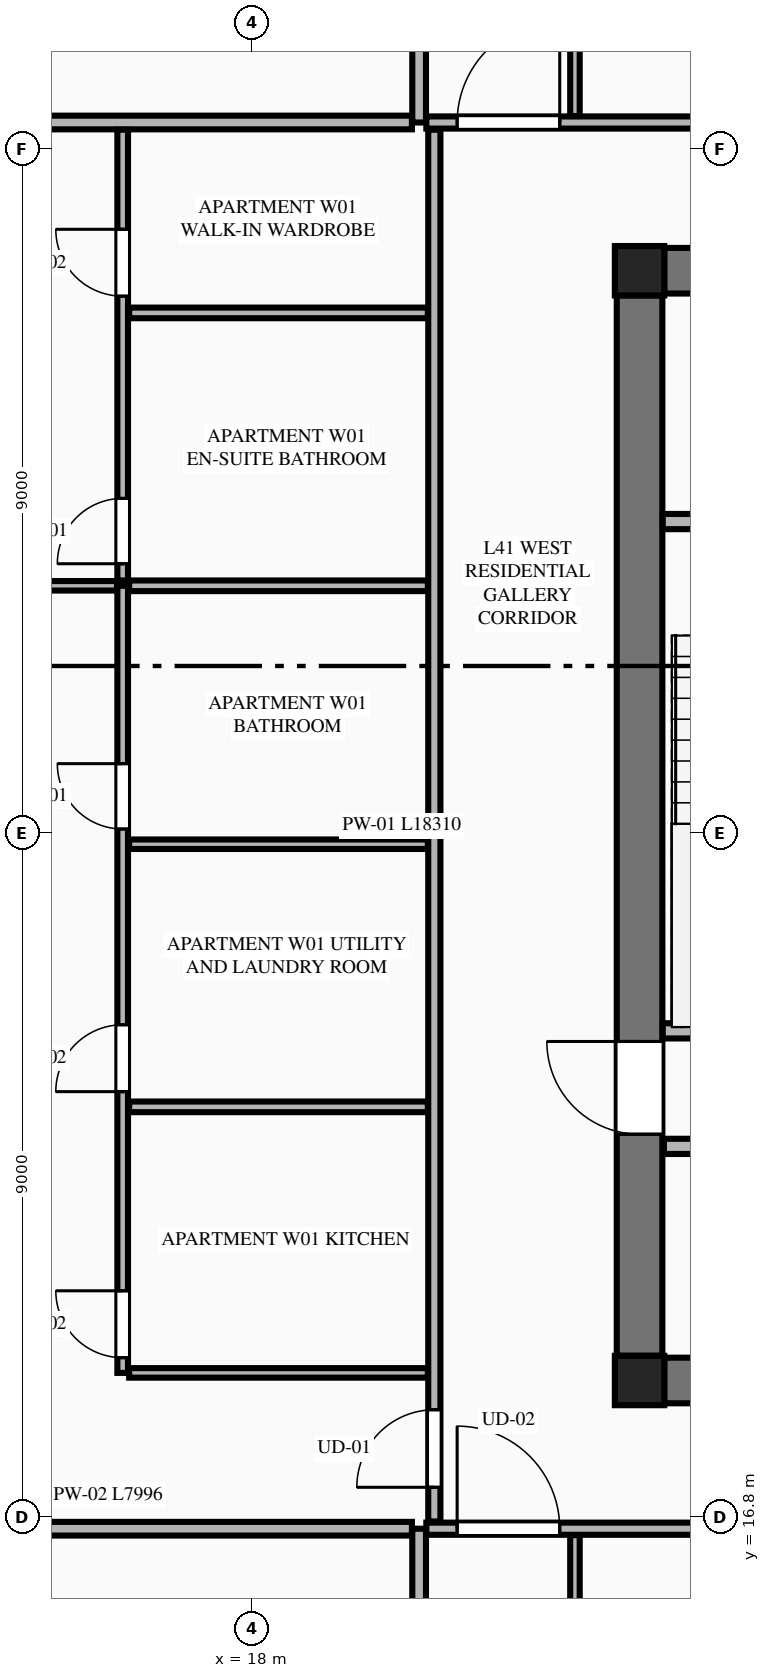
"""IFC4 building model, lengths in metres.
Left out: names, types, materials, properties, quantities, classifications, styles, units other than length and angle.
Written with IfcOpenShell. Run it as: python <this file> out.ifc"""

import sys

from ifc_helpers import new_model, si_unit, direction, frame, frame_2d, origin, origin_2d, place, context, subcontext, project, spatial, rectangle, extrude, element, fill, save


model = new_model("IFC4")
c1 = context("Model", 3, precision=1e-05, world=origin(), true_north=direction((0.0, 1.0)))
c2 = subcontext(c1, "Body", "Model", "MODEL_VIEW")
j1 = project(units=[si_unit("LENGTHUNIT", "METRE"), si_unit("PLANEANGLEUNIT", "RADIAN")], contexts=[c1])
p1 = place(None, origin())
s1 = spatial("IfcSite", under=j1, at=p1, CompositionType="ELEMENT")
p2 = place(p1, origin())
s2 = spatial("IfcBuilding", under=s1, at=p2, CompositionType="ELEMENT")
p3 = place(p2, frame((0.0, 0.0, 157.05)))
s3 = spatial("IfcBuildingStorey", under=s2, at=p3, CompositionType="ELEMENT", Elevation=157.05)
for number, where, z_axis, x_axis in (
    (1, (23.1, 18.6, 0.0), (0.0, 0.0, 1.0), (1.0, 0.0, 0.0)),
    (2, (23.1, 33.2, 0.0), (0.0, 0.0, 1.0), (1.0, 0.0, 0.0)),
):
    element("IfcColumn", number, at=place(p3, frame(where, z_axis=z_axis, x_axis=x_axis)), inside=s3, PredefinedType="COLUMN", context=c2, shape_type="SweptSolid", body=[
        extrude(rectangle(XDim=0.65, YDim=0.65, at=origin_2d()), origin(), (0.0, 0.0, 1.0), 3.55),
    ])
for number, where, z_axis, x_axis in (
    (3, (23.425, 18.6, 0.0), (0.0, 0.0, 1.0), (1.0, 0.0, 0.0)),
    (4, (23.425, 33.2, 0.0), (0.0, 0.0, 1.0), (1.0, 0.0, 0.0)),
):
    element("IfcWall", number, at=place(p3, frame(where, z_axis=z_axis, x_axis=x_axis)), inside=s3, PredefinedType="SHEAR", context=c2, shape_type="SweptSolid", body=[
        extrude(rectangle(XDim=17.95, YDim=0.6, at=frame_2d((8.975, 0.0))), origin(), (0.0, 0.0, 1.0), 3.34),
    ])
p4 = place(p3, frame((23.1, 18.925, 0.0), z_axis=(0.0, 0.0, 1.0), x_axis=(0.0, 1.0, 0.0)))
e5 = element("IfcWall", 5, at=p4, inside=s3, PredefinedType="SHEAR", context=c2, shape_type="SweptSolid", body=[
    extrude(rectangle(XDim=13.95, YDim=0.6, at=frame_2d((6.975, 0.0))), origin(), (0.0, 0.0, 1.0), 3.34),
])
p5 = place(p4, frame((2.915, 0.0, 0.0)))
e6 = element("IfcOpeningElement", 6, at=p5, cuts=e5, PredefinedType="OPENING", context=c2, shape_type="SweptSolid", body=[
    extrude(rectangle(XDim=1.22, YDim=2.25, at=frame_2d((0.61, 1.125))), frame((0.0, 0.31, 0.0), z_axis=(0.0, -1.0, 0.0), x_axis=(1.0, 0.0, 0.0)), (0.0, 0.0, 1.0), 0.62),
])
p6 = place(p3, frame((23.405, 23.2, 0.0), z_axis=(0.0, 0.0, 1.0), x_axis=(1.0, 0.0, 0.0)))
e7 = element("IfcWall", 7, at=p6, inside=s3, PredefinedType="PLUMBINGWALL", context=c2, shape_type="SweptSolid", body=[
    extrude(rectangle(XDim=3.27, YDim=0.2, at=frame_2d((1.635, 0.0))), origin(), (0.0, 0.0, 1.0), 3.34),
])
p7 = place(p3, frame((23.405, 29.9, 0.0), z_axis=(0.0, 0.0, 1.0), x_axis=(1.0, 0.0, 0.0)))
e8 = element("IfcWall", 8, at=p7, inside=s3, PredefinedType="PLUMBINGWALL", context=c2, shape_type="SweptSolid", body=[
    extrude(rectangle(XDim=3.27, YDim=0.2, at=frame_2d((1.635, 0.0))), origin(), (0.0, 0.0, 1.0), 3.34),
])
p8 = place(p7, frame((1.85, 0.0, 0.0)))
e9 = element("IfcOpeningElement", 9, at=p8, cuts=e8, PredefinedType="OPENING", context=c2, shape_type="SweptSolid", body=[
    extrude(rectangle(XDim=0.85, YDim=2.05, at=frame_2d((0.425, 1.025))), frame((0.0, 0.11, 0.0), z_axis=(0.0, -1.0, 0.0), x_axis=(1.0, 0.0, 0.0)), (0.0, 0.0, 1.0), 0.22),
])
p9 = place(p3, frame((23.42, 21.68, 0.0), z_axis=(0.0, 0.0, 1.0), x_axis=(1.0, 0.0, 0.0)))
e10 = element("IfcWall", 10, at=p9, inside=s3, PredefinedType="PLUMBINGWALL", context=c2, shape_type="SweptSolid", body=[
    extrude(rectangle(XDim=17.96, YDim=0.2, at=frame_2d((8.98, 0.0))), origin(), (0.0, 0.0, 1.0), 3.34),
])
p10 = place(p9, frame((11.6, 0.0, 0.0)))
e11 = element("IfcOpeningElement", 11, at=p10, cuts=e10, PredefinedType="OPENING", context=c2, shape_type="SweptSolid", body=[
    extrude(rectangle(XDim=1.1, YDim=2.2, at=frame_2d((0.55, 1.1))), frame((0.0, 0.11, 0.0), z_axis=(0.0, -1.0, 0.0), x_axis=(1.0, 0.0, 0.0)), (0.0, 0.0, 1.0), 0.22),
])
p11 = place(p9, frame((0.41, 0.0, 0.0)))
e12 = element("IfcOpeningElement", 12, at=p11, cuts=e10, PredefinedType="OPENING", context=c2, shape_type="SweptSolid", body=[
    extrude(rectangle(XDim=0.85, YDim=2.05, at=frame_2d((0.425, 1.025))), frame((0.0, 0.11, 0.0), z_axis=(0.0, -1.0, 0.0), x_axis=(1.0, 0.0, 0.0)), (0.0, 0.0, 1.0), 0.22),
])
p12 = place(p9, frame((13.78, 0.0, 0.0)))
e13 = element("IfcOpeningElement", 13, at=p12, cuts=e10, PredefinedType="OPENING", context=c2, shape_type="SweptSolid", body=[
    extrude(rectangle(XDim=0.85, YDim=2.05, at=frame_2d((0.425, 1.025))), frame((0.0, 0.11, 0.0), z_axis=(0.0, -1.0, 0.0), x_axis=(1.0, 0.0, 0.0)), (0.0, 0.0, 1.0), 0.22),
])
p13 = place(p9, frame((16.13, 0.0, 0.0)))
e14 = element("IfcOpeningElement", 14, at=p13, cuts=e10, PredefinedType="OPENING", context=c2, shape_type="SweptSolid", body=[
    extrude(rectangle(XDim=0.85, YDim=2.05, at=frame_2d((0.425, 1.025))), frame((0.0, 0.11, 0.0), z_axis=(0.0, -1.0, 0.0), x_axis=(1.0, 0.0, 0.0)), (0.0, 0.0, 1.0), 0.22),
])
p14 = place(p3, frame((20.2, 4.105, 0.0), z_axis=(0.0, 0.0, 1.0), x_axis=(0.0, 1.0, 0.0)))
e15 = element("IfcWall", 15, at=p14, inside=s3, PredefinedType="PARTITIONING", context=c2, shape_type="SweptSolid", body=[
    extrude(rectangle(XDim=12.545, YDim=0.18, at=frame_2d((6.272, 0.0))), origin(), (0.0, 0.0, 1.0), 3.34),
])
p15 = place(p3, frame((20.295, 16.65, 0.0), z_axis=(0.0, 0.0, 1.0), x_axis=(1.0, 0.0, 0.0)))
e16 = element("IfcWall", 16, at=p15, inside=s3, PredefinedType="PARTITIONING", context=c2, shape_type="SweptSolid", body=[
    extrude(rectangle(XDim=15.842, YDim=0.16, at=frame_2d((7.921, 0.0))), origin(), (0.0, 0.0, 1.0), 3.34),
])
p16 = place(p15, frame((0.405, 0.0, 0.0)))
e17 = element("IfcOpeningElement", 17, at=p16, cuts=e16, PredefinedType="OPENING", context=c2, shape_type="SweptSolid", body=[
    extrude(rectangle(XDim=1.35, YDim=2.35, at=frame_2d((0.675, 1.175))), frame((0.0, 0.09, 0.0), z_axis=(0.0, -1.0, 0.0), x_axis=(1.0, 0.0, 0.0)), (0.0, 0.0, 1.0), 0.18),
])
p17 = place(p3, frame((22.25, 9.981, 0.0), z_axis=(0.0, 0.0, 1.0), x_axis=(0.0, 1.0, 0.0)))
e18 = element("IfcWall", 18, at=p17, inside=s3, PredefinedType="PARTITIONING", context=c2, shape_type="SweptSolid", body=[
    extrude(rectangle(XDim=6.584, YDim=0.125, at=frame_2d((3.292, 0.0))), origin(), (0.0, 0.0, 1.0), 2.722),
])
p18 = place(p3, frame((20.2, 35.15, 0.0), z_axis=(0.0, 0.0, 1.0), x_axis=(0.0, 1.0, 0.0)))
e19 = element("IfcWall", 19, at=p18, inside=s3, PredefinedType="PARTITIONING", context=c2, shape_type="SweptSolid", body=[
    extrude(rectangle(XDim=12.345, YDim=0.18, at=frame_2d((6.173, 0.0))), origin(), (0.0, 0.0, 1.0), 3.34),
])
p19 = place(p3, frame((20.295, 35.15, 0.0), z_axis=(0.0, 0.0, 1.0), x_axis=(1.0, 0.0, 0.0)))
e20 = element("IfcWall", 20, at=p19, inside=s3, PredefinedType="PARTITIONING", context=c2, shape_type="SweptSolid", body=[
    extrude(rectangle(XDim=24.21, YDim=0.16, at=frame_2d((12.105, 0.0))), origin(), (0.0, 0.0, 1.0), 3.34),
])
p20 = place(p19, frame((0.405, 0.0, 0.0)))
e21 = element("IfcOpeningElement", 21, at=p20, cuts=e20, PredefinedType="OPENING", context=c2, shape_type="SweptSolid", body=[
    extrude(rectangle(XDim=1.35, YDim=2.35, at=frame_2d((0.675, 1.175))), frame((0.0, 0.09, 0.0), z_axis=(0.0, -1.0, 0.0), x_axis=(1.0, 0.0, 0.0)), (0.0, 0.0, 1.0), 0.18),
])
p21 = place(p3, frame((22.25, 35.235, 0.0), z_axis=(0.0, 0.0, 1.0), x_axis=(0.0, 1.0, 0.0)))
e22 = element("IfcWall", 22, at=p21, inside=s3, PredefinedType="PARTITIONING", context=c2, shape_type="SweptSolid", body=[
    extrude(rectangle(XDim=4.625, YDim=0.125, at=frame_2d((2.312, 0.0))), origin(), (0.0, 0.0, 1.0), 2.722),
])
p22 = place(p3, frame((12.109, 16.65, 0.0), z_axis=(0.0, 0.0, 1.0), x_axis=(1.0, 0.0, 0.0)))
e23 = element("IfcWall", 23, at=p22, inside=s3, PredefinedType="PARTITIONING", context=c2, shape_type="SweptSolid", body=[
    extrude(rectangle(XDim=7.996, YDim=0.18, at=frame_2d((3.998, 0.0))), origin(), (0.0, 0.0, 1.0), 3.34),
])
p23 = place(p3, frame((12.21, 35.15, 0.0), z_axis=(0.0, 0.0, 1.0), x_axis=(1.0, 0.0, 0.0)))
e24 = element("IfcWall", 24, at=p23, inside=s3, PredefinedType="PARTITIONING", context=c2, shape_type="SweptSolid", body=[
    extrude(rectangle(XDim=7.895, YDim=0.18, at=frame_2d((3.948, 0.0))), origin(), (0.0, 0.0, 1.0), 3.34),
])
p24 = place(p3, frame((20.4, 16.745, 0.0), z_axis=(0.0, 0.0, 1.0), x_axis=(0.0, 1.0, 0.0)))
e25 = element("IfcWall", 25, at=p24, inside=s3, PredefinedType="PARTITIONING", context=c2, shape_type="SweptSolid", body=[
    extrude(rectangle(XDim=18.31, YDim=0.16, at=frame_2d((9.155, 0.0))), origin(), (0.0, 0.0, 1.0), 3.34),
])
p25 = place(p24, frame((0.45, 0.0, 0.0)))
e26 = element("IfcOpeningElement", 26, at=p25, cuts=e25, PredefinedType="OPENING", context=c2, shape_type="SweptSolid", body=[
    extrude(rectangle(XDim=1.02, YDim=2.25, at=frame_2d((0.51, 1.125))), frame((0.0, 0.09, 0.0), z_axis=(0.0, -1.0, 0.0), x_axis=(1.0, 0.0, 0.0)), (0.0, 0.0, 1.0), 0.18),
])
p26 = place(p3, frame((16.385, 18.7, 0.0), z_axis=(0.0, 0.0, 1.0), x_axis=(1.0, 0.0, 0.0)))
e27 = element("IfcWall", 27, at=p26, inside=s3, PredefinedType="PARTITIONING", context=c2, shape_type="SweptSolid", body=[
    extrude(rectangle(XDim=3.93, YDim=0.125, at=frame_2d((1.965, 0.0))), origin(), (0.0, 0.0, 1.0), 2.722),
])
p27 = place(p3, frame((16.3, 18.7, 0.0), z_axis=(0.0, 0.0, 1.0), x_axis=(0.0, 1.0, 0.0)))
e28 = element("IfcWall", 28, at=p27, inside=s3, PredefinedType="PLUMBINGWALL", context=c2, shape_type="SweptSolid", body=[
    extrude(rectangle(XDim=10.355, YDim=0.14, at=frame_2d((5.177, 0.0))), origin(), (0.0, 0.0, 1.0), 3.34),
])
p28 = place(p27, frame((0.2, 0.0, 0.0)))
e29 = element("IfcOpeningElement", 29, at=p28, cuts=e28, PredefinedType="OPENING", context=c2, shape_type="SweptSolid", body=[
    extrude(rectangle(XDim=0.88, YDim=2.15, at=frame_2d((0.44, 1.075))), frame((0.0, 0.08, 0.0), z_axis=(0.0, -1.0, 0.0), x_axis=(1.0, 0.0, 0.0)), (0.0, 0.0, 1.0), 0.16),
])
p29 = place(p27, frame((3.7, 0.0, 0.0)))
e30 = element("IfcOpeningElement", 30, at=p29, cuts=e28, PredefinedType="OPENING", context=c2, shape_type="SweptSolid", body=[
    extrude(rectangle(XDim=0.88, YDim=2.15, at=frame_2d((0.44, 1.075))), frame((0.0, 0.08, 0.0), z_axis=(0.0, -1.0, 0.0), x_axis=(1.0, 0.0, 0.0)), (0.0, 0.0, 1.0), 0.16),
])
p30 = place(p27, frame((7.155, 0.0, 0.0)))
e31 = element("IfcOpeningElement", 31, at=p30, cuts=e28, PredefinedType="OPENING", context=c2, shape_type="SweptSolid", body=[
    extrude(rectangle(XDim=0.86, YDim=2.1, at=frame_2d((0.43, 1.05))), frame((0.0, 0.08, 0.0), z_axis=(0.0, -1.0, 0.0), x_axis=(1.0, 0.0, 0.0)), (0.0, 0.0, 1.0), 0.16),
])
p31 = place(p3, frame((16.3, 29.125, 0.0), z_axis=(0.0, 0.0, 1.0), x_axis=(0.0, 1.0, 0.0)))
e32 = element("IfcWall", 32, at=p31, inside=s3, PredefinedType="PLUMBINGWALL", context=c2, shape_type="SweptSolid", body=[
    extrude(rectangle(XDim=5.93, YDim=0.14, at=frame_2d((2.965, 0.0))), origin(), (0.0, 0.0, 1.0), 3.34),
])
p32 = place(p31, frame((0.22, 0.0, 0.0)))
e33 = element("IfcOpeningElement", 33, at=p32, cuts=e32, PredefinedType="OPENING", context=c2, shape_type="SweptSolid", body=[
    extrude(rectangle(XDim=0.86, YDim=2.1, at=frame_2d((0.43, 1.05))), frame((0.0, 0.08, 0.0), z_axis=(0.0, -1.0, 0.0), x_axis=(1.0, 0.0, 0.0)), (0.0, 0.0, 1.0), 0.16),
])
p33 = place(p31, frame((3.74, 0.0, 0.0)))
e34 = element("IfcOpeningElement", 34, at=p33, cuts=e32, PredefinedType="OPENING", context=c2, shape_type="SweptSolid", body=[
    extrude(rectangle(XDim=0.88, YDim=2.15, at=frame_2d((0.44, 1.075))), frame((0.0, 0.08, 0.0), z_axis=(0.0, -1.0, 0.0), x_axis=(1.0, 0.0, 0.0)), (0.0, 0.0, 1.0), 0.16),
])
p34 = place(p3, frame((16.385, 29.055, 0.0), z_axis=(0.0, 0.0, 1.0), x_axis=(1.0, 0.0, 0.0)))
e35 = element("IfcWall", 35, at=p34, inside=s3, PredefinedType="PLUMBINGWALL", context=c2, shape_type="SweptSolid", body=[
    extrude(rectangle(XDim=3.93, YDim=0.14, at=frame_2d((1.965, 0.0))), origin(), (0.0, 0.0, 1.0), 3.34),
])
p35 = place(p3, frame((9.111, 29.055, 0.0), z_axis=(0.0, 0.0, 1.0), x_axis=(1.0, 0.0, 0.0)))
e36 = element("IfcWall", 36, at=p35, inside=s3, PredefinedType="PARTITIONING", context=c2, shape_type="SweptSolid", body=[
    extrude(rectangle(XDim=7.114, YDim=0.125, at=frame_2d((3.557, 0.0))), origin(), (0.0, 0.0, 1.0), 3.34),
])
p36 = place(p35, frame((0.35, 0.0, 0.0)))
e37 = element("IfcOpeningElement", 37, at=p36, cuts=e36, PredefinedType="OPENING", context=c2, shape_type="SweptSolid", body=[
    extrude(rectangle(XDim=0.92, YDim=2.15, at=frame_2d((0.46, 1.075))), frame((0.0, 0.073, 0.0), z_axis=(0.0, -1.0, 0.0), x_axis=(1.0, 0.0, 0.0)), (0.0, 0.0, 1.0), 0.145),
])
p37 = place(p3, frame((16.385, 22.2, 0.0), z_axis=(0.0, 0.0, 1.0), x_axis=(1.0, 0.0, 0.0)))
e38 = element("IfcWall", 38, at=p37, inside=s3, PredefinedType="PLUMBINGWALL", context=c2, shape_type="SweptSolid", body=[
    extrude(rectangle(XDim=3.93, YDim=0.14, at=frame_2d((1.965, 0.0))), origin(), (0.0, 0.0, 1.0), 3.34),
])
p38 = place(p3, frame((16.385, 25.655, 0.0), z_axis=(0.0, 0.0, 1.0), x_axis=(1.0, 0.0, 0.0)))
e39 = element("IfcWall", 39, at=p38, inside=s3, PredefinedType="PARTITIONING", context=c2, shape_type="SweptSolid", body=[
    extrude(rectangle(XDim=3.93, YDim=0.125, at=frame_2d((1.965, 0.0))), origin(), (0.0, 0.0, 1.0), 3.34),
])
p39 = place(p3, frame((16.385, 32.645, 0.0), z_axis=(0.0, 0.0, 1.0), x_axis=(1.0, 0.0, 0.0)))
e40 = element("IfcWall", 40, at=p39, inside=s3, PredefinedType="PLUMBINGWALL", context=c2, shape_type="SweptSolid", body=[
    extrude(rectangle(XDim=3.93, YDim=0.14, at=frame_2d((1.965, 0.0))), origin(), (0.0, 0.0, 1.0), 3.34),
])
p40 = place(p5, origin())
e41 = element("IfcDoor", 41, at=p40, inside=s3, OperationType="SINGLE_SWING_RIGHT", PredefinedType="DOOR", context=c2, shape_type="SweptSolid", body=[
    extrude(rectangle(XDim=1.22, YDim=2.25, at=frame_2d((0.61, 1.125))), frame((0.0, 0.025, 0.0), z_axis=(0.0, -1.0, 0.0), x_axis=(1.0, 0.0, 0.0)), (0.0, 0.0, 1.0), 0.05),
])
fill(e6, e41)
p41 = place(p16, origin())
e42 = element("IfcDoor", 42, at=p41, inside=s3, OperationType="SINGLE_SWING_LEFT", PredefinedType="DOOR", context=c2, shape_type="SweptSolid", body=[
    extrude(rectangle(XDim=1.35, YDim=2.35, at=frame_2d((0.675, 1.175))), frame((0.0, 0.025, 0.0), z_axis=(0.0, -1.0, 0.0), x_axis=(1.0, 0.0, 0.0)), (0.0, 0.0, 1.0), 0.05),
])
fill(e17, e42)
p42 = place(p20, origin())
e43 = element("IfcDoor", 43, at=p42, inside=s3, OperationType="SINGLE_SWING_RIGHT", PredefinedType="DOOR", context=c2, shape_type="SweptSolid", body=[
    extrude(rectangle(XDim=1.35, YDim=2.35, at=frame_2d((0.675, 1.175))), frame((0.0, 0.025, 0.0), z_axis=(0.0, -1.0, 0.0), x_axis=(1.0, 0.0, 0.0)), (0.0, 0.0, 1.0), 0.05),
])
fill(e21, e43)
p43 = place(p28, origin())
e44 = element("IfcDoor", 44, at=p43, inside=s3, OperationType="SINGLE_SWING_RIGHT", PredefinedType="DOOR", context=c2, shape_type="SweptSolid", body=[
    extrude(rectangle(XDim=0.88, YDim=2.15, at=frame_2d((0.44, 1.075))), frame((0.0, 0.025, 0.0), z_axis=(0.0, -1.0, 0.0), x_axis=(1.0, 0.0, 0.0)), (0.0, 0.0, 1.0), 0.05),
])
fill(e29, e44)
p44 = place(p29, origin())
e45 = element("IfcDoor", 45, at=p44, inside=s3, OperationType="SINGLE_SWING_LEFT", PredefinedType="DOOR", context=c2, shape_type="SweptSolid", body=[
    extrude(rectangle(XDim=0.88, YDim=2.15, at=frame_2d((0.44, 1.075))), frame((0.0, 0.025, 0.0), z_axis=(0.0, -1.0, 0.0), x_axis=(1.0, 0.0, 0.0)), (0.0, 0.0, 1.0), 0.05),
])
fill(e30, e45)
p45 = place(p30, origin())
e46 = element("IfcDoor", 46, at=p45, inside=s3, OperationType="SINGLE_SWING_RIGHT", PredefinedType="DOOR", context=c2, shape_type="SweptSolid", body=[
    extrude(rectangle(XDim=0.86, YDim=2.1, at=frame_2d((0.43, 1.05))), frame((0.0, 0.025, 0.0), z_axis=(0.0, -1.0, 0.0), x_axis=(1.0, 0.0, 0.0)), (0.0, 0.0, 1.0), 0.05),
])
fill(e31, e46)
p46 = place(p32, origin())
e47 = element("IfcDoor", 47, at=p46, inside=s3, OperationType="SINGLE_SWING_LEFT", PredefinedType="DOOR", context=c2, shape_type="SweptSolid", body=[
    extrude(rectangle(XDim=0.86, YDim=2.1, at=frame_2d((0.43, 1.05))), frame((0.0, 0.025, 0.0), z_axis=(0.0, -1.0, 0.0), x_axis=(1.0, 0.0, 0.0)), (0.0, 0.0, 1.0), 0.05),
])
fill(e33, e47)
p47 = place(p33, origin())
e48 = element("IfcDoor", 48, at=p47, inside=s3, OperationType="SINGLE_SWING_RIGHT", PredefinedType="DOOR", context=c2, shape_type="SweptSolid", body=[
    extrude(rectangle(XDim=0.88, YDim=2.15, at=frame_2d((0.44, 1.075))), frame((0.0, 0.025, 0.0), z_axis=(0.0, -1.0, 0.0), x_axis=(1.0, 0.0, 0.0)), (0.0, 0.0, 1.0), 0.05),
])
fill(e34, e48)
p48 = place(p25, origin())
e49 = element("IfcDoor", 49, at=p48, inside=s3, OperationType="SINGLE_SWING_LEFT", PredefinedType="DOOR", context=c2, shape_type="SweptSolid", body=[
    extrude(rectangle(XDim=1.02, YDim=2.25, at=frame_2d((0.51, 1.125))), frame((0.0, 0.025, 0.0), z_axis=(0.0, -1.0, 0.0), x_axis=(1.0, 0.0, 0.0)), (0.0, 0.0, 1.0), 0.05),
])
fill(e26, e49)
save(model, sys.argv[1])
